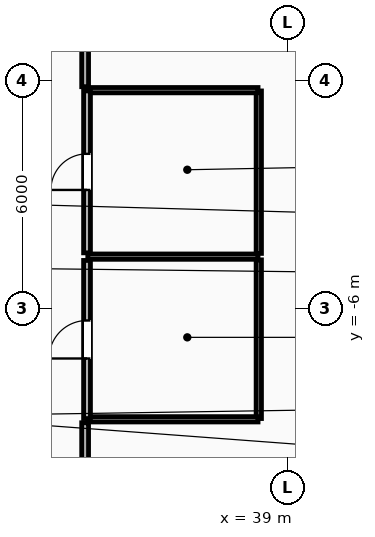
"""IFC4 building model, lengths in metres.
Left out: names, types, materials, properties, quantities, classifications, styles, units other than length and angle.
Written with IfcOpenShell. Run it as: python <this file> out.ifc"""

import sys

from ifc_helpers import new_model, si_unit, direction, frame, frame_2d, origin, place, context, subcontext, project, spatial, rectangle, extrude, element, fill, save


model = new_model("IFC4")
c1 = context("Model", 3, precision=1e-05, world=origin(), true_north=direction((0.0, 1.0)))
c2 = subcontext(c1, "Body", "Model", "MODEL_VIEW")
j1 = project(units=[si_unit("LENGTHUNIT", "METRE"), si_unit("PLANEANGLEUNIT", "RADIAN")], contexts=[c1])
p1 = place(None, origin())
s1 = spatial("IfcSite", under=j1, at=p1, CompositionType="ELEMENT")
p2 = place(p1, origin())
s2 = spatial("IfcBuilding", under=s1, at=p2, CompositionType="ELEMENT")
p3 = place(p2, frame((0.0, 0.0, 69.6)))
s3 = spatial("IfcBuildingStorey", under=s2, at=p3, CompositionType="ELEMENT", Elevation=69.6)
p4 = place(p3, frame((38.24, -8.89, 0.0), z_axis=(0.0, 0.0, 1.0), x_axis=(0.0, 1.0, 0.0)))
e1 = element("IfcWall", 1, at=p4, inside=s3, PredefinedType="PARTITIONING", context=c2, shape_type="SweptSolid", body=[
    extrude(rectangle(XDim=4.175, YDim=0.14, at=frame_2d((2.087, 0.0))), origin(), (0.0, 0.0, 1.0), 3.5),
])
p5 = place(p3, frame((38.24, -4.545, 0.0), z_axis=(0.0, 0.0, 1.0), x_axis=(0.0, 1.0, 0.0)))
e2 = element("IfcWall", 2, at=p5, inside=s3, PredefinedType="PARTITIONING", context=c2, shape_type="SweptSolid", body=[
    extrude(rectangle(XDim=4.275, YDim=0.14, at=frame_2d((2.137, 0.0))), origin(), (0.0, 0.0, 1.0), 3.5),
])
for number, where, z_axis, x_axis in (
    (3, (33.74, -0.25, 0.0), (0.0, 0.0, 1.0), (1.0, 0.0, 0.0)),
    (4, (33.74, -4.63, 0.0), (0.0, 0.0, 1.0), (1.0, 0.0, 0.0)),
    (5, (33.74, -8.91, 0.0), (0.0, 0.0, 1.0), (1.0, 0.0, 0.0)),
):
    element("IfcWall", number, at=place(p3, frame(where, z_axis=z_axis, x_axis=x_axis)), inside=s3, PredefinedType="PARTITIONING", context=c2, shape_type="SweptSolid", body=[
        extrude(rectangle(XDim=4.48, YDim=0.14, at=frame_2d((2.24, 0.0))), origin(), (0.0, 0.0, 1.0), 3.5),
    ])
p6 = place(p3, frame((33.72, -4.53, 0.0), z_axis=(0.0, 0.0, 1.0), x_axis=(0.0, 1.0, 0.0)))
e6 = element("IfcWall", 6, at=p6, inside=s3, PredefinedType="PARTITIONING", context=c2, shape_type="SweptSolid", body=[
    extrude(rectangle(XDim=4.26, YDim=0.18, at=frame_2d((2.13, 0.0))), origin(), (0.0, 0.0, 1.0), 3.5),
])
p7 = place(p6, frame((1.655, 0.0, 0.0)))
e7 = element("IfcOpeningElement", 7, at=p7, cuts=e6, PredefinedType="OPENING", context=c2, shape_type="SweptSolid", body=[
    extrude(rectangle(XDim=0.95, YDim=2.1, at=frame_2d((0.475, 1.05))), frame((0.0, 0.1, 0.0), z_axis=(0.0, -1.0, 0.0), x_axis=(1.0, 0.0, 0.0)), (0.0, 0.0, 1.0), 0.2),
])
p8 = place(p3, frame((33.72, -8.89, 0.0), z_axis=(0.0, 0.0, 1.0), x_axis=(0.0, 1.0, 0.0)))
e8 = element("IfcWall", 8, at=p8, inside=s3, PredefinedType="PARTITIONING", context=c2, shape_type="SweptSolid", body=[
    extrude(rectangle(XDim=4.16, YDim=0.18, at=frame_2d((2.08, 0.0))), origin(), (0.0, 0.0, 1.0), 3.5),
])
p9 = place(p8, frame((1.58, 0.0, 0.0)))
e9 = element("IfcOpeningElement", 9, at=p9, cuts=e8, PredefinedType="OPENING", context=c2, shape_type="SweptSolid", body=[
    extrude(rectangle(XDim=1.0, YDim=2.15, at=frame_2d((0.5, 1.075))), frame((0.0, 0.1, 0.0), z_axis=(0.0, -1.0, 0.0), x_axis=(1.0, 0.0, 0.0)), (0.0, 0.0, 1.0), 0.2),
])
p10 = place(p3, frame((33.67, -0.159, 0.0), z_axis=(0.0, 0.0, 1.0), x_axis=(0.0, 1.0, 0.0)))
e10 = element("IfcWall", 10, at=p10, inside=s3, PredefinedType="PARTITIONING", context=c2, shape_type="SweptSolid", body=[
    extrude(rectangle(XDim=11.559, YDim=0.18, at=frame_2d((5.779, 0.0))), origin(), (0.0, 0.0, 1.0), 3.5),
])
p11 = place(p3, frame((33.67, -17.428, 0.0), z_axis=(0.0, 0.0, 1.0), x_axis=(0.0, 1.0, 0.0)))
e11 = element("IfcWall", 11, at=p11, inside=s3, PredefinedType="PARTITIONING", context=c2, shape_type="SweptSolid", body=[
    extrude(rectangle(XDim=8.427, YDim=0.18, at=frame_2d((4.213, 0.0))), origin(), (0.0, 0.0, 1.0), 3.5),
])
p12 = place(p7, origin())
e12 = element("IfcDoor", 12, at=p12, inside=s3, OperationType="SINGLE_SWING_LEFT", PredefinedType="DOOR", context=c2, shape_type="SweptSolid", body=[
    extrude(rectangle(XDim=0.95, YDim=2.1, at=frame_2d((0.475, 1.05))), frame((0.0, 0.025, 0.0), z_axis=(0.0, -1.0, 0.0), x_axis=(1.0, 0.0, 0.0)), (0.0, 0.0, 1.0), 0.05),
])
fill(e7, e12)
p13 = place(p9, origin())
e13 = element("IfcDoor", 13, at=p13, inside=s3, OperationType="SINGLE_SWING_LEFT", PredefinedType="DOOR", context=c2, shape_type="SweptSolid", body=[
    extrude(rectangle(XDim=1.0, YDim=2.15, at=frame_2d((0.5, 1.075))), frame((0.0, 0.025, 0.0), z_axis=(0.0, -1.0, 0.0), x_axis=(1.0, 0.0, 0.0)), (0.0, 0.0, 1.0), 0.05),
])
fill(e9, e13)
save(model, sys.argv[1])
